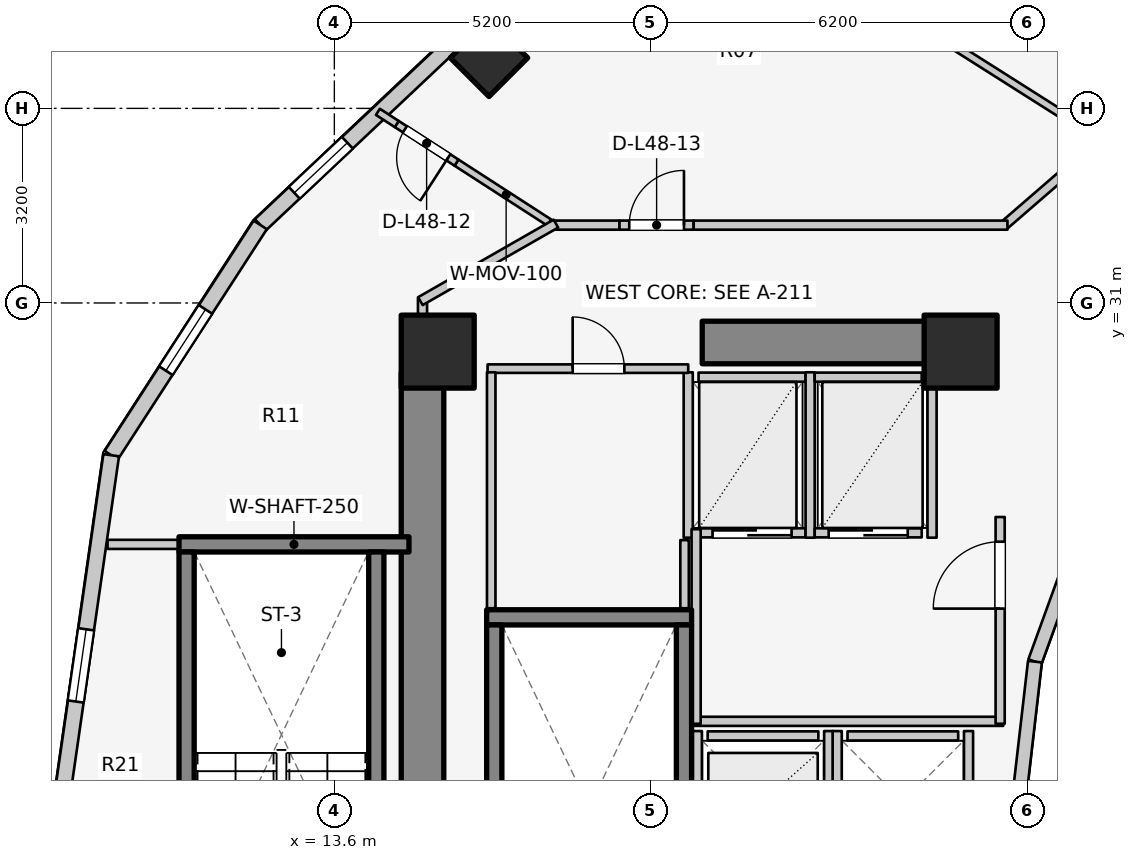
"""IFC4 building model, lengths in metres.
Left out: names, types, materials, properties, quantities, classifications, styles, units other than length and angle.
Written with IfcOpenShell. Run it as: python <this file> out.ifc"""

import sys

from ifc_helpers import new_model, si_unit, direction, frame, frame_2d, origin, origin_2d, place, context, subcontext, project, spatial, rectangle, extrude, element, fill, save


model = new_model("IFC4")
c1 = context("Model", 3, precision=1e-05, world=origin(), true_north=direction((0.0, 1.0)))
c2 = subcontext(c1, "Body", "Model", "MODEL_VIEW")
j1 = project(units=[si_unit("LENGTHUNIT", "METRE"), si_unit("PLANEANGLEUNIT", "RADIAN")], contexts=[c1])
p1 = place(None, origin())
s1 = spatial("IfcSite", under=j1, at=p1, CompositionType="ELEMENT")
p2 = place(p1, origin())
s2 = spatial("IfcBuilding", under=s1, at=p2, CompositionType="ELEMENT")
p3 = place(p2, frame((0.0, 0.0, 159.1)))
s3 = spatial("IfcBuildingStorey", under=s2, at=p3, CompositionType="ELEMENT", Elevation=159.1)
p4 = place(p3, frame((15.05, 17.05, 0.0), z_axis=(0.0, 0.0, 1.0), x_axis=(0.0, 1.0, 0.0)))
e1 = element("IfcWall", 1, at=p4, inside=s3, PredefinedType="SHEAR", context=c2, shape_type="SweptSolid", body=[
    extrude(rectangle(XDim=12.8, YDim=0.7, at=frame_2d((6.4, 0.0))), origin(), (0.0, 0.0, 1.0), 3.1),
])
p5 = place(p3, frame((19.65, 30.35, 0.0), z_axis=(0.0, 0.0, 1.0), x_axis=(1.0, 0.0, 0.0)))
e2 = element("IfcWall", 2, at=p5, inside=s3, PredefinedType="SHEAR", context=c2, shape_type="SweptSolid", body=[
    extrude(rectangle(XDim=4.5, YDim=0.7, at=frame_2d((2.25, 0.0))), origin(), (0.0, 0.0, 1.0), 3.1),
])
p6 = place(p3, frame((16.105, 25.83, 0.0), z_axis=(0.0, 0.0, 1.0), x_axis=(1.0, 0.0, 0.0)))
e3 = element("IfcWall", 3, at=p6, inside=s3, PredefinedType="SOLIDWALL", context=c2, shape_type="SweptSolid", body=[
    extrude(rectangle(XDim=3.37, YDim=0.25, at=frame_2d((1.685, 0.0))), origin(), (0.0, 0.0, 1.0), 3.1),
])
for number, where, z_axis, x_axis in (
    (4, (16.23, 17.895, 0.0), (0.0, 0.0, 1.0), (0.0, 1.0, 0.0)),
    (5, (19.35, 17.895, 0.0), (0.0, 0.0, 1.0), (0.0, 1.0, 0.0)),
):
    element("IfcWall", number, at=place(p3, frame(where, z_axis=z_axis, x_axis=x_axis)), inside=s3, PredefinedType="SOLIDWALL", context=c2, shape_type="SweptSolid", body=[
        extrude(rectangle(XDim=7.81, YDim=0.25, at=frame_2d((3.905, 0.0))), origin(), (0.0, 0.0, 1.0), 3.1),
    ])
p7 = place(p3, frame((11.045, 27.03, 0.0), z_axis=(0.0, 0.0, 1.0), x_axis=(1.0, 0.0, 0.0)))
e6 = element("IfcWall", 6, at=p7, inside=s3, PredefinedType="SOLIDWALL", context=c2, shape_type="SweptSolid", body=[
    extrude(rectangle(XDim=3.782, YDim=0.25, at=frame_2d((1.891, 0.0))), origin(), (0.0, 0.0, 1.0), 3.1),
])
for number, where, z_axis, x_axis in (
    (7, (11.17, 19.095, 0.0), (0.0, 0.0, 1.0), (0.0, 1.0, 0.0)),
    (8, (14.29, 19.095, 0.0), (0.0, 0.0, 1.0), (0.0, 1.0, 0.0)),
):
    element("IfcWall", number, at=place(p3, frame(where, z_axis=z_axis, x_axis=x_axis)), inside=s3, PredefinedType="SOLIDWALL", context=c2, shape_type="SweptSolid", body=[
        extrude(rectangle(XDim=7.81, YDim=0.25, at=frame_2d((3.905, 0.0))), origin(), (0.0, 0.0, 1.0), 3.1),
    ])
for number, where, z_axis, x_axis in (
    (9, (23.9, 30.2, 0.0), (0.0, 0.0, 1.0), (1.0, 0.0, 0.0)),
    (10, (15.3, 30.2, 0.0), (0.0, 0.0, 1.0), (1.0, 0.0, 0.0)),
):
    element("IfcColumn", number, at=place(p3, frame(where, z_axis=z_axis, x_axis=x_axis)), inside=s3, PredefinedType="COLUMN", context=c2, shape_type="SweptSolid", body=[
        extrude(rectangle(XDim=1.2, YDim=1.2, at=origin_2d()), origin(), (0.0, 0.0, 1.0), 3.1),
    ])
p8 = place(p3, frame((16.143, 35.031, 0.0), z_axis=(0.0, 0.0, 1.0), x_axis=(-0.707106781187, 0.707106781187, 0.0)))
e11 = element("IfcColumn", 11, at=p8, inside=s3, PredefinedType="COLUMN", context=c2, shape_type="SweptSolid", body=[
    extrude(rectangle(XDim=0.9, YDim=0.9, at=origin_2d()), origin(), (0.0, 0.0, 1.0), 3.1),
])
p9 = place(p3, frame((25.834, 27.06, 0.0), z_axis=(0.0, 0.0, 1.0), x_axis=(-0.341423187295, -0.93990968033, 0.0)))
e12 = element("IfcWall", 12, at=p9, inside=s3, PredefinedType="STANDARD", context=c2, shape_type="SweptSolid", body=[
    extrude(rectangle(XDim=2.084, YDim=0.23, at=frame_2d((1.042, 0.0))), origin(), (0.0, 0.0, 1.0), 2.56),
])
p10 = place(p3, frame((25.123, 25.102, 0.0), z_axis=(0.0, 0.0, 1.0), x_axis=(-0.114711713601, -0.993398823617, 0.0)))
e13 = element("IfcWall", 13, at=p10, inside=s3, PredefinedType="STANDARD", context=c2, shape_type="SweptSolid", body=[
    extrude(rectangle(XDim=2.115, YDim=0.23, at=frame_2d((1.058, 0.0))), origin(), (0.0, 0.0, 1.0), 2.56),
])
p11 = place(p3, frame((15.731, 35.441, 0.0), z_axis=(0.0, 0.0, 1.0), x_axis=(-0.727667301037, -0.68593024354, 0.0)))
e14 = element("IfcWall", 14, at=p11, inside=s3, PredefinedType="STANDARD", context=c2, shape_type="SweptSolid", body=[
    extrude(rectangle(XDim=4.604, YDim=0.26, at=frame_2d((2.302, 0.0))), origin(), (0.0, 0.0, 1.0), 1.22),
])
p12 = place(p11, frame((2.634, 0.0, 0.15)))
e15 = element("IfcOpeningElement", 15, at=p12, cuts=e14, PredefinedType="OPENING", context=c2, shape_type="SweptSolid", body=[
    extrude(rectangle(XDim=1.2, YDim=0.9, at=frame_2d((0.6, 0.45))), frame((0.0, 0.14, 0.0), z_axis=(0.0, -1.0, 0.0), x_axis=(1.0, 0.0, 0.0)), (0.0, 0.0, 1.0), 0.28),
])
p13 = place(p3, frame((12.381, 32.284, 0.0), z_axis=(0.0, 0.0, 1.0), x_axis=(-0.543358984534, -0.839500454989, 0.0)))
e16 = element("IfcWall", 16, at=p13, inside=s3, PredefinedType="STANDARD", context=c2, shape_type="SweptSolid", body=[
    extrude(rectangle(XDim=4.511, YDim=0.26, at=frame_2d((2.256, 0.0))), origin(), (0.0, 0.0, 1.0), 1.22),
])
p14 = place(p13, frame((1.656, 0.0, 0.15)))
e17 = element("IfcOpeningElement", 17, at=p14, cuts=e16, PredefinedType="OPENING", context=c2, shape_type="SweptSolid", body=[
    extrude(rectangle(XDim=1.2, YDim=0.9, at=frame_2d((0.6, 0.45))), frame((0.0, 0.14, 0.0), z_axis=(0.0, -1.0, 0.0), x_axis=(1.0, 0.0, 0.0)), (0.0, 0.0, 1.0), 0.28),
])
p15 = place(p3, frame((9.93, 28.497, 0.0), z_axis=(0.0, 0.0, 1.0), x_axis=(-0.142227632286, -0.989833976288, 0.0)))
e18 = element("IfcWall", 18, at=p15, inside=s3, PredefinedType="STANDARD", context=c2, shape_type="SweptSolid", body=[
    extrude(rectangle(XDim=5.553, YDim=0.26, at=frame_2d((2.776, 0.0))), origin(), (0.0, 0.0, 1.0), 2.57),
])
p16 = place(p15, frame((2.892, 0.0, 0.75)))
e19 = element("IfcOpeningElement", 19, at=p16, cuts=e18, PredefinedType="OPENING", context=c2, shape_type="SweptSolid", body=[
    extrude(rectangle(XDim=1.2, YDim=1.5, at=frame_2d((0.6, 0.75))), frame((0.0, 0.14, 0.0), z_axis=(0.0, -1.0, 0.0), x_axis=(1.0, 0.0, 0.0)), (0.0, 0.0, 1.0), 0.28),
])
p17 = place(p3, frame((19.74, 23.88, 0.0), z_axis=(0.0, 0.0, 1.0), x_axis=(1.0, 0.0, 0.0)))
e20 = element("IfcWall", 20, at=p17, inside=s3, PredefinedType="SOLIDWALL", context=c2, shape_type="SweptSolid", body=[
    extrude(rectangle(XDim=1.82, YDim=0.15, at=frame_2d((0.91, 0.0))), origin(), (0.0, 0.0, 1.0), 2.575),
])
for number, where, z_axis, x_axis in (
    (21, (19.57, 21.64, 0.0), (0.0, 0.0, 1.0), (0.0, 1.0, 0.0)),
    (22, (21.73, 21.64, 0.0), (0.0, 0.0, 1.0), (0.0, 1.0, 0.0)),
):
    element("IfcWall", number, at=place(p3, frame(where, z_axis=z_axis, x_axis=x_axis)), inside=s3, PredefinedType="SOLIDWALL", context=c2, shape_type="SweptSolid", body=[
        extrude(rectangle(XDim=2.32, YDim=0.15, at=frame_2d((1.16, 0.0))), origin(), (0.0, 0.0, 1.0), 2.575),
    ])
p18 = place(p3, frame((22.04, 23.88, 0.0), z_axis=(0.0, 0.0, 1.0), x_axis=(1.0, 0.0, 0.0)))
e23 = element("IfcWall", 23, at=p18, inside=s3, PredefinedType="SOLIDWALL", context=c2, shape_type="SweptSolid", body=[
    extrude(rectangle(XDim=1.82, YDim=0.15, at=frame_2d((0.91, 0.0))), origin(), (0.0, 0.0, 1.0), 2.12),
])
p19 = place(p3, frame((21.87, 21.64, 0.0), z_axis=(0.0, 0.0, 1.0), x_axis=(0.0, 1.0, 0.0)))
e24 = element("IfcWall", 24, at=p19, inside=s3, PredefinedType="SOLIDWALL", context=c2, shape_type="SweptSolid", body=[
    extrude(rectangle(XDim=2.32, YDim=0.15, at=frame_2d((1.16, 0.0))), origin(), (0.0, 0.0, 1.0), 2.575),
])
p20 = place(p3, frame((24.03, 21.64, 0.0), z_axis=(0.0, 0.0, 1.0), x_axis=(0.0, 1.0, 0.0)))
e25 = element("IfcWall", 25, at=p20, inside=s3, PredefinedType="SOLIDWALL", context=c2, shape_type="SweptSolid", body=[
    extrude(rectangle(XDim=2.32, YDim=0.15, at=frame_2d((1.16, 0.0))), origin(), (0.0, 0.0, 1.0), 2.12),
])
p21 = place(p3, frame((19.59, 27.22, 0.0), z_axis=(0.0, 0.0, 1.0), x_axis=(1.0, 0.0, 0.0)))
e26 = element("IfcWall", 26, at=p21, inside=s3, PredefinedType="SOLIDWALL", context=c2, shape_type="SweptSolid", body=[
    extrude(rectangle(XDim=1.76, YDim=0.15, at=frame_2d((0.88, 0.0))), origin(), (0.0, 0.0, 1.0), 2.575),
])
p22 = place(p21, frame((0.23, 0.0, 0.0)))
e27 = element("IfcOpeningElement", 27, at=p22, cuts=e26, PredefinedType="OPENING", context=c2, shape_type="SweptSolid", body=[
    extrude(rectangle(XDim=1.3, YDim=2.1, at=frame_2d((0.65, 1.05))), frame((0.0, 0.085, 0.0), z_axis=(0.0, -1.0, 0.0), x_axis=(1.0, 0.0, 0.0)), (0.0, 0.0, 1.0), 0.17),
])
p23 = place(p3, frame((19.59, 29.78, 0.0), z_axis=(0.0, 0.0, 1.0), x_axis=(1.0, 0.0, 0.0)))
e28 = element("IfcWall", 28, at=p23, inside=s3, PredefinedType="SOLIDWALL", context=c2, shape_type="SweptSolid", body=[
    extrude(rectangle(XDim=1.76, YDim=0.15, at=frame_2d((0.88, 0.0))), origin(), (0.0, 0.0, 1.0), 2.575),
])
for number, where, z_axis, x_axis in (
    (29, (19.42, 27.14, 0.0), (0.0, 0.0, 1.0), (0.0, 1.0, 0.0)),
    (30, (21.425, 27.14, 0.0), (0.0, 0.0, 1.0), (0.0, 1.0, 0.0)),
):
    element("IfcWall", number, at=place(p3, frame(where, z_axis=z_axis, x_axis=x_axis)), inside=s3, PredefinedType="SOLIDWALL", context=c2, shape_type="SweptSolid", body=[
        extrude(rectangle(XDim=2.72, YDim=0.15, at=frame_2d((1.36, 0.0))), origin(), (0.0, 0.0, 1.0), 2.575),
    ])
p24 = place(p3, frame((21.5, 27.22, 0.0), z_axis=(0.0, 0.0, 1.0), x_axis=(1.0, 0.0, 0.0)))
e31 = element("IfcWall", 31, at=p24, inside=s3, PredefinedType="SOLIDWALL", context=c2, shape_type="SweptSolid", body=[
    extrude(rectangle(XDim=1.76, YDim=0.15, at=frame_2d((0.88, 0.0))), origin(), (0.0, 0.0, 1.0), 2.575),
])
p25 = place(p24, frame((0.23, 0.0, 0.0)))
e32 = element("IfcOpeningElement", 32, at=p25, cuts=e31, PredefinedType="OPENING", context=c2, shape_type="SweptSolid", body=[
    extrude(rectangle(XDim=1.3, YDim=2.1, at=frame_2d((0.65, 1.05))), frame((0.0, 0.085, 0.0), z_axis=(0.0, -1.0, 0.0), x_axis=(1.0, 0.0, 0.0)), (0.0, 0.0, 1.0), 0.17),
])
p26 = place(p3, frame((21.5, 29.78, 0.0), z_axis=(0.0, 0.0, 1.0), x_axis=(1.0, 0.0, 0.0)))
e33 = element("IfcWall", 33, at=p26, inside=s3, PredefinedType="SOLIDWALL", context=c2, shape_type="SweptSolid", body=[
    extrude(rectangle(XDim=1.76, YDim=0.15, at=frame_2d((0.88, 0.0))), origin(), (0.0, 0.0, 1.0), 2.575),
])
p27 = place(p3, frame((23.43, 27.14, 0.0), z_axis=(0.0, 0.0, 1.0), x_axis=(0.0, 1.0, 0.0)))
e34 = element("IfcWall", 34, at=p27, inside=s3, PredefinedType="SOLIDWALL", context=c2, shape_type="SweptSolid", body=[
    extrude(rectangle(XDim=2.72, YDim=0.15, at=frame_2d((1.36, 0.0))), origin(), (0.0, 0.0, 1.0), 2.575),
])
p28 = place(p3, frame((19.52, 24.12, 0.0), z_axis=(0.0, 0.0, 1.0), x_axis=(1.0, 0.0, 0.0)))
e35 = element("IfcWall", 35, at=p28, inside=s3, PredefinedType="PARTITIONING", context=c2, shape_type="SweptSolid", body=[
    extrude(rectangle(XDim=5.08, YDim=0.15, at=frame_2d((2.54, 0.0))), origin(), (0.0, 0.0, 1.0), 2.12),
])
p29 = place(p3, frame((19.55, 24.08, 0.0), z_axis=(0.0, 0.0, 1.0), x_axis=(0.0, 1.0, 0.0)))
e36 = element("IfcWall", 36, at=p29, inside=s3, PredefinedType="PARTITIONING", context=c2, shape_type="SweptSolid", body=[
    extrude(rectangle(XDim=3.2, YDim=0.15, at=frame_2d((1.6, 0.0))), origin(), (0.0, 0.0, 1.0), 2.575),
])
p30 = place(p3, frame((24.55, 24.08, 0.0), z_axis=(0.0, 0.0, 1.0), x_axis=(0.0, 1.0, 0.0)))
e37 = element("IfcWall", 37, at=p30, inside=s3, PredefinedType="PARTITIONING", context=c2, shape_type="SweptSolid", body=[
    extrude(rectangle(XDim=3.4, YDim=0.15, at=frame_2d((1.7, 0.0))), origin(), (0.0, 0.0, 1.0), 2.575),
])
p31 = place(p30, frame((1.894, 0.0, 0.0)))
e38 = element("IfcOpeningElement", 38, at=p31, cuts=e37, PredefinedType="OPENING", context=c2, shape_type="SweptSolid", body=[
    extrude(rectangle(XDim=1.1, YDim=2.1, at=frame_2d((0.55, 1.05))), frame((0.0, 0.085, 0.0), z_axis=(0.0, -1.0, 0.0), x_axis=(1.0, 0.0, 0.0)), (0.0, 0.0, 1.0), 0.17),
])
p32 = place(p3, frame((16.12, 29.92, 0.0), z_axis=(0.0, 0.0, 1.0), x_axis=(1.0, 0.0, 0.0)))
e39 = element("IfcWall", 39, at=p32, inside=s3, PredefinedType="PLUMBINGWALL", context=c2, shape_type="SweptSolid", body=[
    extrude(rectangle(XDim=3.3, YDim=0.14, at=frame_2d((1.65, 0.0))), origin(), (0.0, 0.0, 1.0), 2.575),
])
p33 = place(p32, frame((1.399, 0.0, 0.0)))
e40 = element("IfcOpeningElement", 40, at=p33, cuts=e39, PredefinedType="OPENING", context=c2, shape_type="SweptSolid", body=[
    extrude(rectangle(XDim=0.85, YDim=2.05, at=frame_2d((0.425, 1.025))), frame((0.0, 0.08, 0.0), z_axis=(0.0, -1.0, 0.0), x_axis=(1.0, 0.0, 0.0)), (0.0, 0.0, 1.0), 0.16),
])
p34 = place(p3, frame((16.18, 25.98, 0.0), z_axis=(0.0, 0.0, 1.0), x_axis=(0.0, 1.0, 0.0)))
e41 = element("IfcWall", 41, at=p34, inside=s3, PredefinedType="PLUMBINGWALL", context=c2, shape_type="SweptSolid", body=[
    extrude(rectangle(XDim=3.88, YDim=0.14, at=frame_2d((1.94, 0.0))), origin(), (0.0, 0.0, 1.0), 2.575),
])
p35 = place(p3, frame((19.36, 25.98, 0.0), z_axis=(0.0, 0.0, 1.0), x_axis=(0.0, 1.0, 0.0)))
e42 = element("IfcWall", 42, at=p35, inside=s3, PredefinedType="PLUMBINGWALL", context=c2, shape_type="SweptSolid", body=[
    extrude(rectangle(XDim=1.12, YDim=0.14, at=frame_2d((0.56, 0.0))), origin(), (0.0, 0.0, 1.0), 2.575),
])
p36 = place(p3, frame((9.87, 27.03, 0.0), z_axis=(0.0, 0.0, 1.0), x_axis=(1.0, 0.0, 0.0)))
e43 = element("IfcWall", 43, at=p36, inside=s3, PredefinedType="PARTITIONING", context=c2, shape_type="SweptSolid", body=[
    extrude(rectangle(XDim=1.17, YDim=0.15, at=frame_2d((0.585, 0.0))), origin(), (0.0, 0.0, 1.0), 2.575),
])
p37 = place(p3, frame((15.05, 29.8, 0.0), z_axis=(0.0, 0.0, 1.0), x_axis=(0.0, 1.0, 0.0)))
e44 = element("IfcWall", 44, at=p37, inside=s3, PredefinedType="PARTITIONING", context=c2, shape_type="SweptSolid", body=[
    extrude(rectangle(XDim=1.29, YDim=0.15, at=frame_2d((0.645, 0.0))), origin(), (0.0, 0.0, 1.0), 1.22),
])
p38 = place(p3, frame((17.242, 32.253, 0.0), z_axis=(0.0, 0.0, 1.0), x_axis=(-0.839960690577, 0.542647250325, 0.0)))
e45 = element("IfcWall", 45, at=p38, inside=s3, PredefinedType="MOVABLE", context=c2, shape_type="SweptSolid", body=[
    extrude(rectangle(XDim=1.945, YDim=0.12, at=frame_2d((0.972, 0.0))), origin(), (0.0, 0.0, 1.0), 1.22),
])
p39 = place(p3, frame((15.609, 33.308, 0.0), z_axis=(0.0, 0.0, 1.0), x_axis=(-0.839989837614, 0.542602131129, 0.0)))
e46 = element("IfcWall", 46, at=p39, inside=s3, PredefinedType="MOVABLE", context=c2, shape_type="SweptSolid", body=[
    extrude(rectangle(XDim=1.17, YDim=0.12, at=frame_2d((0.585, 0.0))), origin(), (0.0, 0.0, 1.0), 2.11),
])
p40 = place(p39, frame((0.16, 0.0, 0.0)))
e47 = element("IfcOpeningElement", 47, at=p40, cuts=e46, PredefinedType="OPENING", context=c2, shape_type="SweptSolid", body=[
    extrude(rectangle(XDim=0.85, YDim=2.05, at=frame_2d((0.425, 1.025))), frame((0.0, 0.07, 0.0), z_axis=(0.0, -1.0, 0.0), x_axis=(1.0, 0.0, 0.0)), (0.0, 0.0, 1.0), 0.14),
])
p41 = place(p3, frame((14.626, 33.943, 0.0), z_axis=(0.0, 0.0, 1.0), x_axis=(-0.840014217141, 0.542564387885, 0.0)))
e48 = element("IfcWall", 48, at=p41, inside=s3, PredefinedType="MOVABLE", context=c2, shape_type="SweptSolid", body=[
    extrude(rectangle(XDim=0.368, YDim=0.12, at=frame_2d((0.184, 0.0))), origin(), (0.0, 0.0, 1.0), 2.575),
])
p42 = place(p3, frame((26.193, 33.642, 0.0), z_axis=(0.0, 0.0, 1.0), x_axis=(-0.756055312247, -0.654507727092, 0.0)))
e49 = element("IfcWall", 49, at=p42, inside=s3, PredefinedType="PARTITIONING", context=c2, shape_type="SweptSolid", body=[
    extrude(rectangle(XDim=2.111, YDim=0.15, at=frame_2d((1.055, 0.0))), origin(), (0.0, 0.0, 1.0), 1.22),
])
p43 = place(p3, frame((17.15, 32.28, 0.0), z_axis=(0.0, 0.0, 1.0), x_axis=(1.0, 0.0, 0.0)))
e50 = element("IfcWall", 50, at=p43, inside=s3, PredefinedType="PARTITIONING", context=c2, shape_type="SweptSolid", body=[
    extrude(rectangle(XDim=1.14, YDim=0.15, at=frame_2d((0.57, 0.0))), origin(), (0.0, 0.0, 1.0), 2.575),
])
p44 = place(p3, frame((18.29, 32.28, 0.0), z_axis=(0.0, 0.0, 1.0), x_axis=(1.0, 0.0, 0.0)))
e51 = element("IfcWall", 51, at=p44, inside=s3, PredefinedType="PARTITIONING", context=c2, shape_type="SweptSolid", body=[
    extrude(rectangle(XDim=1.22, YDim=0.15, at=frame_2d((0.61, 0.0))), origin(), (0.0, 0.0, 1.0), 2.575),
])
p45 = place(p44, frame((0.16, 0.0, 0.0)))
e52 = element("IfcOpeningElement", 52, at=p45, cuts=e51, PredefinedType="OPENING", context=c2, shape_type="SweptSolid", body=[
    extrude(rectangle(XDim=0.9, YDim=2.1, at=frame_2d((0.45, 1.05))), frame((0.0, 0.085, 0.0), z_axis=(0.0, -1.0, 0.0), x_axis=(1.0, 0.0, 0.0)), (0.0, 0.0, 1.0), 0.17),
])
p46 = place(p3, frame((19.51, 32.28, 0.0), z_axis=(0.0, 0.0, 1.0), x_axis=(1.0, 0.0, 0.0)))
e53 = element("IfcWall", 53, at=p46, inside=s3, PredefinedType="PARTITIONING", context=c2, shape_type="SweptSolid", body=[
    extrude(rectangle(XDim=5.16, YDim=0.15, at=frame_2d((2.58, 0.0))), origin(), (0.0, 0.0, 1.0), 1.22),
])
p47 = place(p3, frame((17.243, 32.305, 0.0), z_axis=(0.0, 0.0, 1.0), x_axis=(-0.867991349648, -0.496579315857, 0.0)))
e54 = element("IfcWall", 54, at=p47, inside=s3, PredefinedType="PARTITIONING", context=c2, shape_type="SweptSolid", body=[
    extrude(rectangle(XDim=2.567, YDim=0.15, at=frame_2d((1.283, 0.0))), origin(), (0.0, 0.0, 1.0), 1.22),
])
p48 = place(p3, frame((28.98, 34.952, 0.0), z_axis=(0.0, 0.0, 1.0), x_axis=(-0.647173462792, 0.762342776615, 0.0)))
e55 = element("IfcWall", 55, at=p48, inside=s3, PredefinedType="PARTITIONING", context=c2, shape_type="SweptSolid", body=[
    extrude(rectangle(XDim=6.253, YDim=0.125, at=frame_2d((3.127, 0.0))), origin(), (0.0, 0.0, 1.0), 1.22),
])
p49 = place(p3, frame((26.188, 33.708, 0.0), z_axis=(0.0, 0.0, 1.0), x_axis=(-0.844640430122, 0.535334048799, 0.0)))
e56 = element("IfcWall", 56, at=p49, inside=s3, PredefinedType="PARTITIONING", context=c2, shape_type="SweptSolid", body=[
    extrude(rectangle(XDim=7.188, YDim=0.125, at=frame_2d((3.594, 0.0))), origin(), (0.0, 0.0, 1.0), 1.22),
])
p50 = place(p12, origin())
e57 = element("IfcWindow", 57, at=p50, inside=s3, PartitioningType="SINGLE_PANEL", PredefinedType="WINDOW", context=c2, shape_type="SweptSolid", body=[
    extrude(rectangle(XDim=1.2, YDim=0.9, at=frame_2d((0.6, 0.45))), frame((0.0, 0.03, 0.0), z_axis=(0.0, -1.0, 0.0), x_axis=(1.0, 0.0, 0.0)), (0.0, 0.0, 1.0), 0.06),
])
fill(e15, e57)
p51 = place(p14, origin())
e58 = element("IfcWindow", 58, at=p51, inside=s3, PartitioningType="SINGLE_PANEL", PredefinedType="WINDOW", context=c2, shape_type="SweptSolid", body=[
    extrude(rectangle(XDim=1.2, YDim=0.9, at=frame_2d((0.6, 0.45))), frame((0.0, 0.03, 0.0), z_axis=(0.0, -1.0, 0.0), x_axis=(1.0, 0.0, 0.0)), (0.0, 0.0, 1.0), 0.06),
])
fill(e17, e58)
p52 = place(p16, origin())
e59 = element("IfcWindow", 59, at=p52, inside=s3, PartitioningType="SINGLE_PANEL", PredefinedType="WINDOW", context=c2, shape_type="SweptSolid", body=[
    extrude(rectangle(XDim=1.2, YDim=1.5, at=frame_2d((0.6, 0.75))), frame((0.0, 0.03, 0.0), z_axis=(0.0, -1.0, 0.0), x_axis=(1.0, 0.0, 0.0)), (0.0, 0.0, 1.0), 0.06),
])
fill(e19, e59)
p53 = place(p22, origin())
e60 = element("IfcDoor", 60, at=p53, inside=s3, OperationType="DOUBLE_DOOR_SLIDING", PredefinedType="DOOR", context=c2, shape_type="SweptSolid", body=[
    extrude(rectangle(XDim=1.3, YDim=2.1, at=frame_2d((0.65, 1.05))), frame((0.0, 0.025, 0.0), z_axis=(0.0, -1.0, 0.0), x_axis=(1.0, 0.0, 0.0)), (0.0, 0.0, 1.0), 0.05),
])
fill(e27, e60)
p54 = place(p25, origin())
e61 = element("IfcDoor", 61, at=p54, inside=s3, OperationType="DOUBLE_DOOR_SLIDING", PredefinedType="DOOR", context=c2, shape_type="SweptSolid", body=[
    extrude(rectangle(XDim=1.3, YDim=2.1, at=frame_2d((0.65, 1.05))), frame((0.0, 0.025, 0.0), z_axis=(0.0, -1.0, 0.0), x_axis=(1.0, 0.0, 0.0)), (0.0, 0.0, 1.0), 0.05),
])
fill(e32, e61)
p55 = place(p31, origin())
e62 = element("IfcDoor", 62, at=p55, inside=s3, OperationType="SINGLE_SWING_LEFT", PredefinedType="DOOR", context=c2, shape_type="SweptSolid", body=[
    extrude(rectangle(XDim=1.1, YDim=2.1, at=frame_2d((0.55, 1.05))), frame((0.0, 0.025, 0.0), z_axis=(0.0, -1.0, 0.0), x_axis=(1.0, 0.0, 0.0)), (0.0, 0.0, 1.0), 0.05),
])
fill(e38, e62)
p56 = place(p33, origin())
e63 = element("IfcDoor", 63, at=p56, inside=s3, OperationType="SINGLE_SWING_LEFT", PredefinedType="DOOR", context=c2, shape_type="SweptSolid", body=[
    extrude(rectangle(XDim=0.85, YDim=2.05, at=frame_2d((0.425, 1.025))), frame((0.0, 0.025, 0.0), z_axis=(0.0, -1.0, 0.0), x_axis=(1.0, 0.0, 0.0)), (0.0, 0.0, 1.0), 0.05),
])
fill(e40, e63)
p57 = place(p40, origin())
e64 = element("IfcDoor", 64, at=p57, inside=s3, OperationType="SINGLE_SWING_LEFT", PredefinedType="DOOR", context=c2, shape_type="SweptSolid", body=[
    extrude(rectangle(XDim=0.85, YDim=2.05, at=frame_2d((0.425, 1.025))), frame((0.0, 0.025, 0.0), z_axis=(0.0, -1.0, 0.0), x_axis=(1.0, 0.0, 0.0)), (0.0, 0.0, 1.0), 0.05),
])
fill(e47, e64)
p58 = place(p45, origin())
e65 = element("IfcDoor", 65, at=p58, inside=s3, OperationType="SINGLE_SWING_RIGHT", PredefinedType="DOOR", context=c2, shape_type="SweptSolid", body=[
    extrude(rectangle(XDim=0.9, YDim=2.1, at=frame_2d((0.45, 1.05))), frame((0.0, 0.025, 0.0), z_axis=(0.0, -1.0, 0.0), x_axis=(1.0, 0.0, 0.0)), (0.0, 0.0, 1.0), 0.05),
])
fill(e52, e65)
save(model, sys.argv[1])
